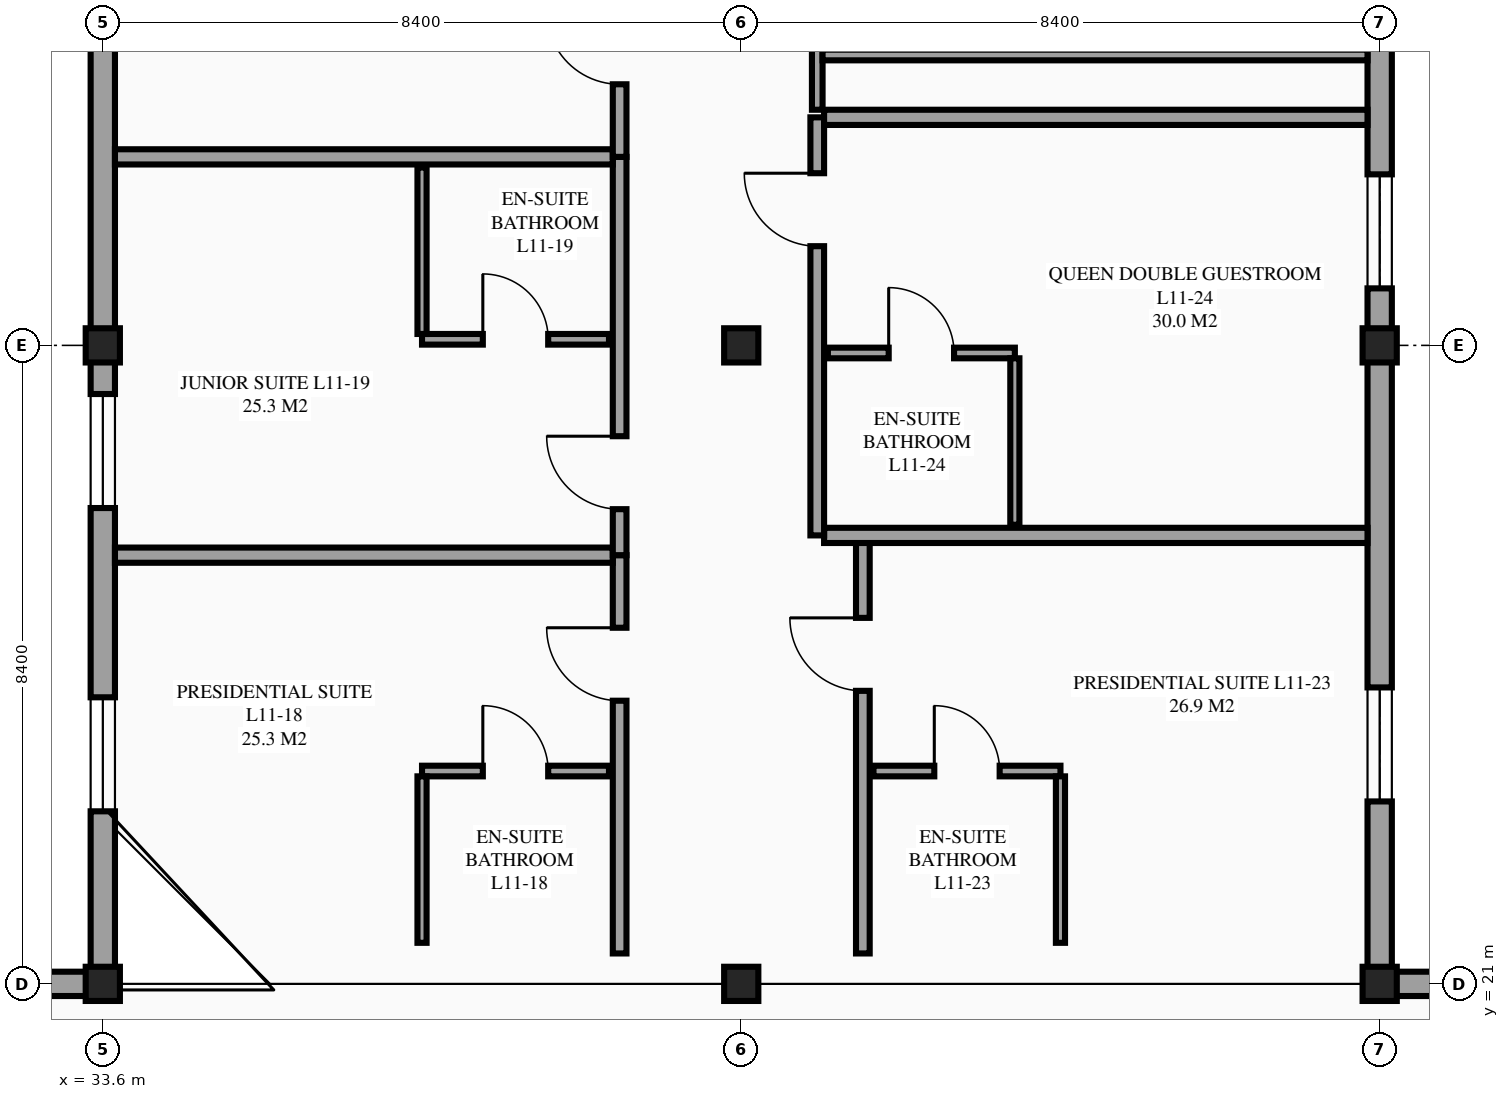
"""IFC4 building model, lengths in metres.
Left out: names, types, materials, properties, quantities, classifications, styles, units other than length and angle.
Written with IfcOpenShell. Run it as: python <this file> out.ifc"""

import sys

from ifc_helpers import new_model, si_unit, direction, frame, frame_2d, origin, origin_2d, place, context, subcontext, project, spatial, rectangle, extrude, element, fill, save


model = new_model("IFC4")
c1 = context("Model", 3, precision=1e-05, world=origin(), true_north=direction((0.0, 1.0)))
c2 = subcontext(c1, "Body", "Model", "MODEL_VIEW")
j1 = project(units=[si_unit("LENGTHUNIT", "METRE"), si_unit("PLANEANGLEUNIT", "RADIAN")], contexts=[c1])
p1 = place(None, origin())
s1 = spatial("IfcSite", under=j1, at=p1, CompositionType="ELEMENT")
p2 = place(p1, origin())
s2 = spatial("IfcBuilding", under=s1, at=p2, CompositionType="ELEMENT")
p3 = place(p2, frame((0.0, 0.0, 43.5)))
s3 = spatial("IfcBuildingStorey", under=s2, at=p3, CompositionType="ELEMENT", Elevation=43.5)
for number, where, z_axis, x_axis in (
    (1, (33.6, 21.0, 0.0), (0.0, 0.0, 1.0), (1.0, 0.0, 0.0)),
    (2, (33.6, 29.4, 0.0), (0.0, 0.0, 1.0), (1.0, 0.0, 0.0)),
    (3, (42.0, 21.0, 0.0), (0.0, 0.0, 1.0), (1.0, 0.0, 0.0)),
    (4, (42.0, 29.4, 0.0), (0.0, 0.0, 1.0), (1.0, 0.0, 0.0)),
    (5, (50.4, 21.0, 0.0), (0.0, 0.0, 1.0), (1.0, 0.0, 0.0)),
    (6, (50.4, 29.4, 0.0), (0.0, 0.0, 1.0), (1.0, 0.0, 0.0)),
):
    element("IfcColumn", number, at=place(p3, frame(where, z_axis=z_axis, x_axis=x_axis)), inside=s3, PredefinedType="COLUMN", context=c2, shape_type="SweptSolid", body=[
        extrude(rectangle(XDim=0.45, YDim=0.45, at=origin_2d()), origin(), (0.0, 0.0, 1.0), 3.6),
    ])
p4 = place(p3, frame((50.4, 21.0, 0.0), z_axis=(0.0, 0.0, 1.0), x_axis=(0.0, 1.0, 0.0)))
e7 = element("IfcWall", 7, at=p4, inside=s3, PredefinedType="STANDARD", context=c2, shape_type="SweptSolid", body=[
    extrude(rectangle(XDim=25.2, YDim=0.32, at=frame_2d((12.6, 0.0))), origin(), (0.0, 0.0, 1.0), 2.51),
])
p5 = place(p4, frame((2.4, 0.0, 0.85)))
e8 = element("IfcOpeningElement", 8, at=p5, cuts=e7, PredefinedType="OPENING", context=c2, shape_type="SweptSolid", body=[
    extrude(rectangle(XDim=1.5, YDim=1.5, at=frame_2d((0.75, 0.75))), frame((0.0, 0.17, 0.0), z_axis=(0.0, -1.0, 0.0), x_axis=(1.0, 0.0, 0.0)), (0.0, 0.0, 1.0), 0.34),
])
p6 = place(p4, frame((9.15, 0.0, 0.85)))
e9 = element("IfcOpeningElement", 9, at=p6, cuts=e7, PredefinedType="OPENING", context=c2, shape_type="SweptSolid", body=[
    extrude(rectangle(XDim=1.5, YDim=1.5, at=frame_2d((0.75, 0.75))), frame((0.0, 0.17, 0.0), z_axis=(0.0, -1.0, 0.0), x_axis=(1.0, 0.0, 0.0)), (0.0, 0.0, 1.0), 0.34),
])
p7 = place(p4, frame((17.9, 0.0, 0.85)))
e10 = element("IfcOpeningElement", 10, at=p7, cuts=e7, PredefinedType="OPENING", context=c2, shape_type="SweptSolid", body=[
    extrude(rectangle(XDim=1.5, YDim=1.5, at=frame_2d((0.75, 0.75))), frame((0.0, 0.17, 0.0), z_axis=(0.0, -1.0, 0.0), x_axis=(1.0, 0.0, 0.0)), (0.0, 0.0, 1.0), 0.34),
])
p8 = place(p4, frame((22.4, 0.0, 0.85)))
e11 = element("IfcOpeningElement", 11, at=p8, cuts=e7, PredefinedType="OPENING", context=c2, shape_type="SweptSolid", body=[
    extrude(rectangle(XDim=1.5, YDim=1.5, at=frame_2d((0.75, 0.75))), frame((0.0, 0.17, 0.0), z_axis=(0.0, -1.0, 0.0), x_axis=(1.0, 0.0, 0.0)), (0.0, 0.0, 1.0), 0.34),
])
p9 = place(p3, frame((33.6, 37.8, 0.0), z_axis=(0.0, 0.0, 1.0), x_axis=(0.0, -1.0, 0.0)))
e12 = element("IfcWall", 12, at=p9, inside=s3, PredefinedType="STANDARD", context=c2, shape_type="SweptSolid", body=[
    extrude(rectangle(XDim=16.8, YDim=0.32, at=frame_2d((8.4, 0.0))), origin(), (0.0, 0.0, 1.0), 2.76),
])
p10 = place(p9, frame((13.03, 0.0, 0.85)))
e13 = element("IfcOpeningElement", 13, at=p10, cuts=e12, PredefinedType="OPENING", context=c2, shape_type="SweptSolid", body=[
    extrude(rectangle(XDim=1.5, YDim=1.5, at=frame_2d((0.75, 0.75))), frame((0.0, 0.17, 0.0), z_axis=(0.0, -1.0, 0.0), x_axis=(1.0, 0.0, 0.0)), (0.0, 0.0, 1.0), 0.34),
])
p11 = place(p9, frame((9.04, 0.0, 0.85)))
e14 = element("IfcOpeningElement", 14, at=p11, cuts=e12, PredefinedType="OPENING", context=c2, shape_type="SweptSolid", body=[
    extrude(rectangle(XDim=1.5, YDim=1.5, at=frame_2d((0.75, 0.75))), frame((0.0, 0.17, 0.0), z_axis=(0.0, -1.0, 0.0), x_axis=(1.0, 0.0, 0.0)), (0.0, 0.0, 1.0), 0.34),
])
p12 = place(p9, frame((2.55, 0.0, 0.85)))
e15 = element("IfcOpeningElement", 15, at=p12, cuts=e12, PredefinedType="OPENING", context=c2, shape_type="SweptSolid", body=[
    extrude(rectangle(XDim=1.5, YDim=1.5, at=frame_2d((0.75, 0.75))), frame((0.0, 0.17, 0.0), z_axis=(0.0, -1.0, 0.0), x_axis=(1.0, 0.0, 0.0)), (0.0, 0.0, 1.0), 0.34),
])
p13 = place(p3, frame((33.6, 21.0, 0.0), z_axis=(0.0, 0.0, 1.0), x_axis=(-1.0, 0.0, 0.0)))
e16 = element("IfcWall", 16, at=p13, inside=s3, PredefinedType="STANDARD", context=c2, shape_type="SweptSolid", body=[
    extrude(rectangle(XDim=2.0, YDim=0.32, at=frame_2d((1.0, 0.0))), origin(), (0.0, 0.0, 1.0), 3.055),
])
p14 = place(p3, frame((40.4, 21.4, 0.0), z_axis=(0.0, 0.0, 1.0), x_axis=(0.0, 1.0, 0.0)))
e17 = element("IfcWall", 17, at=p14, inside=s3, PredefinedType="PARTITIONING", context=c2, shape_type="SweptSolid", body=[
    extrude(rectangle(XDim=5.24, YDim=0.18, at=frame_2d((2.62, 0.0))), origin(), (0.0, 0.0, 1.0), 3.355),
])
p15 = place(p14, frame((3.325, 0.0, 0.0)))
e18 = element("IfcOpeningElement", 18, at=p15, cuts=e17, PredefinedType="OPENING", context=c2, shape_type="SweptSolid", body=[
    extrude(rectangle(XDim=0.96, YDim=2.15, at=frame_2d((0.48, 1.075))), frame((0.0, 0.1, 0.0), z_axis=(0.0, -1.0, 0.0), x_axis=(1.0, 0.0, 0.0)), (0.0, 0.0, 1.0), 0.2),
])
p16 = place(p3, frame((33.76, 26.64, 0.0), z_axis=(0.0, 0.0, 1.0), x_axis=(1.0, 0.0, 0.0)))
e19 = element("IfcWall", 19, at=p16, inside=s3, PredefinedType="PARTITIONING", context=c2, shape_type="SweptSolid", body=[
    extrude(rectangle(XDim=6.55, YDim=0.2, at=frame_2d((3.275, 0.0))), origin(), (0.0, 0.0, 1.0), 3.355),
])
p17 = place(p3, frame((37.8, 23.8, 0.0), z_axis=(0.0, 0.0, 1.0), x_axis=(1.0, 0.0, 0.0)))
e20 = element("IfcWall", 20, at=p17, inside=s3, PredefinedType="PARTITIONING", context=c2, shape_type="SweptSolid", body=[
    extrude(rectangle(XDim=2.46, YDim=0.14, at=frame_2d((1.23, 0.0))), origin(), (0.0, 0.0, 1.0), 3.355),
])
p18 = place(p17, frame((0.8, 0.0, 0.0)))
e21 = element("IfcOpeningElement", 21, at=p18, cuts=e20, PredefinedType="OPENING", context=c2, shape_type="SweptSolid", body=[
    extrude(rectangle(XDim=0.86, YDim=2.1, at=frame_2d((0.43, 1.05))), frame((0.0, 0.08, 0.0), z_axis=(0.0, -1.0, 0.0), x_axis=(1.0, 0.0, 0.0)), (0.0, 0.0, 1.0), 0.16),
])
p19 = place(p3, frame((37.8, 21.54, 0.0), z_axis=(0.0, 0.0, 1.0), x_axis=(0.0, 1.0, 0.0)))
e22 = element("IfcWall", 22, at=p19, inside=s3, PredefinedType="PARTITIONING", context=c2, shape_type="SweptSolid", body=[
    extrude(rectangle(XDim=2.19, YDim=0.12, at=frame_2d((1.095, 0.0))), origin(), (0.0, 0.0, 1.0), 3.355),
])
p20 = place(p3, frame((40.4, 26.64, 0.0), z_axis=(0.0, 0.0, 1.0), x_axis=(0.0, 1.0, 0.0)))
e23 = element("IfcWall", 23, at=p20, inside=s3, PredefinedType="PARTITIONING", context=c2, shape_type="SweptSolid", body=[
    extrude(rectangle(XDim=5.24, YDim=0.18, at=frame_2d((2.62, 0.0))), origin(), (0.0, 0.0, 1.0), 3.355),
])
p21 = place(p20, frame((0.605, 0.0, 0.0)))
e24 = element("IfcOpeningElement", 24, at=p21, cuts=e23, PredefinedType="OPENING", context=c2, shape_type="SweptSolid", body=[
    extrude(rectangle(XDim=0.96, YDim=2.15, at=frame_2d((0.48, 1.075))), frame((0.0, 0.1, 0.0), z_axis=(0.0, -1.0, 0.0), x_axis=(1.0, 0.0, 0.0)), (0.0, 0.0, 1.0), 0.2),
])
p22 = place(p3, frame((33.76, 31.88, 0.0), z_axis=(0.0, 0.0, 1.0), x_axis=(1.0, 0.0, 0.0)))
e25 = element("IfcWall", 25, at=p22, inside=s3, PredefinedType="PARTITIONING", context=c2, shape_type="SweptSolid", body=[
    extrude(rectangle(XDim=6.55, YDim=0.2, at=frame_2d((3.275, 0.0))), origin(), (0.0, 0.0, 1.0), 3.355),
])
p23 = place(p3, frame((37.8, 29.48, 0.0), z_axis=(0.0, 0.0, 1.0), x_axis=(1.0, 0.0, 0.0)))
e26 = element("IfcWall", 26, at=p23, inside=s3, PredefinedType="PARTITIONING", context=c2, shape_type="SweptSolid", body=[
    extrude(rectangle(XDim=2.46, YDim=0.14, at=frame_2d((1.23, 0.0))), origin(), (0.0, 0.0, 1.0), 2.56),
])
p24 = place(p23, frame((0.8, 0.0, 0.0)))
e27 = element("IfcOpeningElement", 27, at=p24, cuts=e26, PredefinedType="OPENING", context=c2, shape_type="SweptSolid", body=[
    extrude(rectangle(XDim=0.86, YDim=2.1, at=frame_2d((0.43, 1.05))), frame((0.0, 0.08, 0.0), z_axis=(0.0, -1.0, 0.0), x_axis=(1.0, 0.0, 0.0)), (0.0, 0.0, 1.0), 0.16),
])
p25 = place(p3, frame((37.8, 29.55, 0.0), z_axis=(0.0, 0.0, 1.0), x_axis=(0.0, 1.0, 0.0)))
e28 = element("IfcWall", 28, at=p25, inside=s3, PredefinedType="PARTITIONING", context=c2, shape_type="SweptSolid", body=[
    extrude(rectangle(XDim=2.19, YDim=0.12, at=frame_2d((1.095, 0.0))), origin(), (0.0, 0.0, 1.0), 3.355),
])
p26 = place(p3, frame((40.4, 31.88, 0.0), z_axis=(0.0, 0.0, 1.0), x_axis=(0.0, 1.0, 0.0)))
e29 = element("IfcWall", 29, at=p26, inside=s3, PredefinedType="PARTITIONING", context=c2, shape_type="SweptSolid", body=[
    extrude(rectangle(XDim=5.24, YDim=0.18, at=frame_2d((2.62, 0.0))), origin(), (0.0, 0.0, 1.0), 3.355),
])
p27 = place(p26, frame((0.955, 0.0, 0.0)))
e30 = element("IfcOpeningElement", 30, at=p27, cuts=e29, PredefinedType="OPENING", context=c2, shape_type="SweptSolid", body=[
    extrude(rectangle(XDim=0.96, YDim=2.15, at=frame_2d((0.48, 1.075))), frame((0.0, 0.1, 0.0), z_axis=(0.0, -1.0, 0.0), x_axis=(1.0, 0.0, 0.0)), (0.0, 0.0, 1.0), 0.2),
])
p28 = place(p3, frame((43.6, 21.4, 0.0), z_axis=(0.0, 0.0, 1.0), x_axis=(0.0, 1.0, 0.0)))
e31 = element("IfcWall", 31, at=p28, inside=s3, PredefinedType="PARTITIONING", context=c2, shape_type="SweptSolid", body=[
    extrude(rectangle(XDim=5.5, YDim=0.18, at=frame_2d((2.75, 0.0))), origin(), (0.0, 0.0, 1.0), 3.355),
])
p29 = place(p28, frame((3.455, 0.0, 0.0)))
e32 = element("IfcOpeningElement", 32, at=p29, cuts=e31, PredefinedType="OPENING", context=c2, shape_type="SweptSolid", body=[
    extrude(rectangle(XDim=0.96, YDim=2.15, at=frame_2d((0.48, 1.075))), frame((0.0, 0.1, 0.0), z_axis=(0.0, -1.0, 0.0), x_axis=(1.0, 0.0, 0.0)), (0.0, 0.0, 1.0), 0.2),
])
p30 = place(p3, frame((43.09, 26.9, 0.0), z_axis=(0.0, 0.0, 1.0), x_axis=(1.0, 0.0, 0.0)))
e33 = element("IfcWall", 33, at=p30, inside=s3, PredefinedType="PARTITIONING", context=c2, shape_type="SweptSolid", body=[
    extrude(rectangle(XDim=7.15, YDim=0.2, at=frame_2d((3.575, 0.0))), origin(), (0.0, 0.0, 1.0), 3.355),
])
p31 = place(p3, frame((43.74, 23.8, 0.0), z_axis=(0.0, 0.0, 1.0), x_axis=(1.0, 0.0, 0.0)))
e34 = element("IfcWall", 34, at=p31, inside=s3, PredefinedType="PARTITIONING", context=c2, shape_type="SweptSolid", body=[
    extrude(rectangle(XDim=2.46, YDim=0.14, at=frame_2d((1.23, 0.0))), origin(), (0.0, 0.0, 1.0), 3.355),
])
p32 = place(p31, frame((0.8, 0.0, 0.0)))
e35 = element("IfcOpeningElement", 35, at=p32, cuts=e34, PredefinedType="OPENING", context=c2, shape_type="SweptSolid", body=[
    extrude(rectangle(XDim=0.86, YDim=2.1, at=frame_2d((0.43, 1.05))), frame((0.0, 0.08, 0.0), z_axis=(0.0, -1.0, 0.0), x_axis=(1.0, 0.0, 0.0)), (0.0, 0.0, 1.0), 0.16),
])
p33 = place(p3, frame((46.2, 21.54, 0.0), z_axis=(0.0, 0.0, 1.0), x_axis=(0.0, 1.0, 0.0)))
e36 = element("IfcWall", 36, at=p33, inside=s3, PredefinedType="PARTITIONING", context=c2, shape_type="SweptSolid", body=[
    extrude(rectangle(XDim=2.19, YDim=0.12, at=frame_2d((1.095, 0.0))), origin(), (0.0, 0.0, 1.0), 3.355),
])
p34 = place(p3, frame((43.0, 26.9, 0.0), z_axis=(0.0, 0.0, 1.0), x_axis=(0.0, 1.0, 0.0)))
e37 = element("IfcWall", 37, at=p34, inside=s3, PredefinedType="PARTITIONING", context=c2, shape_type="SweptSolid", body=[
    extrude(rectangle(XDim=5.5, YDim=0.18, at=frame_2d((2.75, 0.0))), origin(), (0.0, 0.0, 1.0), 3.355),
])
p35 = place(p34, frame((3.805, 0.0, 0.0)))
e38 = element("IfcOpeningElement", 38, at=p35, cuts=e37, PredefinedType="OPENING", context=c2, shape_type="SweptSolid", body=[
    extrude(rectangle(XDim=0.96, YDim=2.15, at=frame_2d((0.48, 1.075))), frame((0.0, 0.1, 0.0), z_axis=(0.0, -1.0, 0.0), x_axis=(1.0, 0.0, 0.0)), (0.0, 0.0, 1.0), 0.2),
])
p36 = place(p3, frame((43.09, 32.4, 0.0), z_axis=(0.0, 0.0, 1.0), x_axis=(1.0, 0.0, 0.0)))
e39 = element("IfcWall", 39, at=p36, inside=s3, PredefinedType="PARTITIONING", context=c2, shape_type="SweptSolid", body=[
    extrude(rectangle(XDim=7.15, YDim=0.2, at=frame_2d((3.575, 0.0))), origin(), (0.0, 0.0, 1.0), 3.355),
])
p37 = place(p3, frame((43.14, 29.3, 0.0), z_axis=(0.0, 0.0, 1.0), x_axis=(1.0, 0.0, 0.0)))
e40 = element("IfcWall", 40, at=p37, inside=s3, PredefinedType="PARTITIONING", context=c2, shape_type="SweptSolid", body=[
    extrude(rectangle(XDim=2.46, YDim=0.14, at=frame_2d((1.23, 0.0))), origin(), (0.0, 0.0, 1.0), 2.51),
])
p38 = place(p37, frame((0.8, 0.0, 0.0)))
e41 = element("IfcOpeningElement", 41, at=p38, cuts=e40, PredefinedType="OPENING", context=c2, shape_type="SweptSolid", body=[
    extrude(rectangle(XDim=0.86, YDim=2.1, at=frame_2d((0.43, 1.05))), frame((0.0, 0.08, 0.0), z_axis=(0.0, -1.0, 0.0), x_axis=(1.0, 0.0, 0.0)), (0.0, 0.0, 1.0), 0.16),
])
p39 = place(p3, frame((45.6, 27.04, 0.0), z_axis=(0.0, 0.0, 1.0), x_axis=(0.0, 1.0, 0.0)))
e42 = element("IfcWall", 42, at=p39, inside=s3, PredefinedType="PARTITIONING", context=c2, shape_type="SweptSolid", body=[
    extrude(rectangle(XDim=2.19, YDim=0.12, at=frame_2d((1.095, 0.0))), origin(), (0.0, 0.0, 1.0), 3.355),
])
p40 = place(p3, frame((43.0, 32.5, 0.0), z_axis=(0.0, 0.0, 1.0), x_axis=(0.0, 1.0, 0.0)))
e43 = element("IfcWall", 43, at=p40, inside=s3, PredefinedType="PARTITIONING", context=c2, shape_type="SweptSolid", body=[
    extrude(rectangle(XDim=4.8, YDim=0.14, at=frame_2d((2.4, 0.0))), origin(), (0.0, 0.0, 1.0), 3.355),
])
p41 = place(p40, frame((2.05, 0.0, 0.0)))
e44 = element("IfcOpeningElement", 44, at=p41, cuts=e43, PredefinedType="OPENING", context=c2, shape_type="SweptSolid", body=[
    extrude(rectangle(XDim=0.9, YDim=2.12, at=frame_2d((0.45, 1.06))), frame((0.0, 0.08, 0.0), z_axis=(0.0, -1.0, 0.0), x_axis=(1.0, 0.0, 0.0)), (0.0, 0.0, 1.0), 0.16),
])
p42 = place(p3, frame((43.07, 33.22, 0.0), z_axis=(0.0, 0.0, 1.0), x_axis=(1.0, 0.0, 0.0)))
e45 = element("IfcWall", 45, at=p42, inside=s3, PredefinedType="PARTITIONING", context=c2, shape_type="SweptSolid", body=[
    extrude(rectangle(XDim=7.17, YDim=0.14, at=frame_2d((3.585, 0.0))), origin(), (0.0, 0.0, 1.0), 3.355),
])
p43 = place(p3, frame((58.8, 21.0, 0.0), z_axis=(0.0, 0.0, 1.0), x_axis=(-1.0, 0.0, 0.0)))
e46 = element("IfcWall", 46, at=p43, inside=s3, PredefinedType="STANDARD", context=c2, shape_type="SweptSolid", body=[
    extrude(rectangle(XDim=8.4, YDim=0.32, at=frame_2d((4.2, 0.0))), origin(), (0.0, 0.0, 1.0), 3.05),
])
p44 = place(p43, frame((3.15, 0.0, 0.75)))
e47 = element("IfcOpeningElement", 47, at=p44, cuts=e46, PredefinedType="OPENING", context=c2, shape_type="SweptSolid", body=[
    extrude(rectangle(XDim=2.1, YDim=1.5, at=frame_2d((1.05, 0.75))), frame((0.0, 0.17, 0.0), z_axis=(0.0, -1.0, 0.0), x_axis=(1.0, 0.0, 0.0)), (0.0, 0.0, 1.0), 0.34),
])
p45 = place(p10, origin())
e48 = element("IfcWindow", 48, at=p45, inside=s3, PartitioningType="SINGLE_PANEL", PredefinedType="WINDOW", context=c2, shape_type="SweptSolid", body=[
    extrude(rectangle(XDim=1.5, YDim=1.5, at=frame_2d((0.75, 0.75))), frame((0.0, 0.03, 0.0), z_axis=(0.0, -1.0, 0.0), x_axis=(1.0, 0.0, 0.0)), (0.0, 0.0, 1.0), 0.06),
])
fill(e13, e48)
p46 = place(p11, origin())
e49 = element("IfcWindow", 49, at=p46, inside=s3, PartitioningType="SINGLE_PANEL", PredefinedType="WINDOW", context=c2, shape_type="SweptSolid", body=[
    extrude(rectangle(XDim=1.5, YDim=1.5, at=frame_2d((0.75, 0.75))), frame((0.0, 0.03, 0.0), z_axis=(0.0, -1.0, 0.0), x_axis=(1.0, 0.0, 0.0)), (0.0, 0.0, 1.0), 0.06),
])
fill(e14, e49)
p47 = place(p5, origin())
e50 = element("IfcWindow", 50, at=p47, inside=s3, PartitioningType="SINGLE_PANEL", PredefinedType="WINDOW", context=c2, shape_type="SweptSolid", body=[
    extrude(rectangle(XDim=1.5, YDim=1.5, at=frame_2d((0.75, 0.75))), frame((0.0, 0.03, 0.0), z_axis=(0.0, -1.0, 0.0), x_axis=(1.0, 0.0, 0.0)), (0.0, 0.0, 1.0), 0.06),
])
fill(e8, e50)
p48 = place(p6, origin())
e51 = element("IfcWindow", 51, at=p48, inside=s3, PartitioningType="SINGLE_PANEL", PredefinedType="WINDOW", context=c2, shape_type="SweptSolid", body=[
    extrude(rectangle(XDim=1.5, YDim=1.5, at=frame_2d((0.75, 0.75))), frame((0.0, 0.03, 0.0), z_axis=(0.0, -1.0, 0.0), x_axis=(1.0, 0.0, 0.0)), (0.0, 0.0, 1.0), 0.06),
])
fill(e9, e51)
p49 = place(p15, origin())
e52 = element("IfcDoor", 52, at=p49, inside=s3, OperationType="SINGLE_SWING_RIGHT", PredefinedType="DOOR", context=c2, shape_type="SweptSolid", body=[
    extrude(rectangle(XDim=0.96, YDim=2.15, at=frame_2d((0.48, 1.075))), frame((0.0, 0.025, 0.0), z_axis=(0.0, -1.0, 0.0), x_axis=(1.0, 0.0, 0.0)), (0.0, 0.0, 1.0), 0.05),
])
fill(e18, e52)
p50 = place(p18, origin())
e53 = element("IfcDoor", 53, at=p50, inside=s3, OperationType="SINGLE_SWING_LEFT", PredefinedType="DOOR", context=c2, shape_type="SweptSolid", body=[
    extrude(rectangle(XDim=0.86, YDim=2.1, at=frame_2d((0.43, 1.05))), frame((0.0, 0.025, 0.0), z_axis=(0.0, -1.0, 0.0), x_axis=(1.0, 0.0, 0.0)), (0.0, 0.0, 1.0), 0.05),
])
fill(e21, e53)
p51 = place(p21, origin())
e54 = element("IfcDoor", 54, at=p51, inside=s3, OperationType="SINGLE_SWING_RIGHT", PredefinedType="DOOR", context=c2, shape_type="SweptSolid", body=[
    extrude(rectangle(XDim=0.96, YDim=2.15, at=frame_2d((0.48, 1.075))), frame((0.0, 0.025, 0.0), z_axis=(0.0, -1.0, 0.0), x_axis=(1.0, 0.0, 0.0)), (0.0, 0.0, 1.0), 0.05),
])
fill(e24, e54)
p52 = place(p24, origin())
e55 = element("IfcDoor", 55, at=p52, inside=s3, OperationType="SINGLE_SWING_LEFT", PredefinedType="DOOR", context=c2, shape_type="SweptSolid", body=[
    extrude(rectangle(XDim=0.86, YDim=2.1, at=frame_2d((0.43, 1.05))), frame((0.0, 0.025, 0.0), z_axis=(0.0, -1.0, 0.0), x_axis=(1.0, 0.0, 0.0)), (0.0, 0.0, 1.0), 0.05),
])
fill(e27, e55)
p53 = place(p27, origin())
e56 = element("IfcDoor", 56, at=p53, inside=s3, OperationType="SINGLE_SWING_RIGHT", PredefinedType="DOOR", context=c2, shape_type="SweptSolid", body=[
    extrude(rectangle(XDim=0.96, YDim=2.15, at=frame_2d((0.48, 1.075))), frame((0.0, 0.025, 0.0), z_axis=(0.0, -1.0, 0.0), x_axis=(1.0, 0.0, 0.0)), (0.0, 0.0, 1.0), 0.05),
])
fill(e30, e56)
p54 = place(p29, origin())
e57 = element("IfcDoor", 57, at=p54, inside=s3, OperationType="SINGLE_SWING_RIGHT", PredefinedType="DOOR", context=c2, shape_type="SweptSolid", body=[
    extrude(rectangle(XDim=0.96, YDim=2.15, at=frame_2d((0.48, 1.075))), frame((0.0, 0.025, 0.0), z_axis=(0.0, -1.0, 0.0), x_axis=(1.0, 0.0, 0.0)), (0.0, 0.0, 1.0), 0.05),
])
fill(e32, e57)
p55 = place(p32, origin())
e58 = element("IfcDoor", 58, at=p55, inside=s3, OperationType="SINGLE_SWING_LEFT", PredefinedType="DOOR", context=c2, shape_type="SweptSolid", body=[
    extrude(rectangle(XDim=0.86, YDim=2.1, at=frame_2d((0.43, 1.05))), frame((0.0, 0.025, 0.0), z_axis=(0.0, -1.0, 0.0), x_axis=(1.0, 0.0, 0.0)), (0.0, 0.0, 1.0), 0.05),
])
fill(e35, e58)
p56 = place(p35, origin())
e59 = element("IfcDoor", 59, at=p56, inside=s3, OperationType="SINGLE_SWING_RIGHT", PredefinedType="DOOR", context=c2, shape_type="SweptSolid", body=[
    extrude(rectangle(XDim=0.96, YDim=2.15, at=frame_2d((0.48, 1.075))), frame((0.0, 0.025, 0.0), z_axis=(0.0, -1.0, 0.0), x_axis=(1.0, 0.0, 0.0)), (0.0, 0.0, 1.0), 0.05),
])
fill(e38, e59)
p57 = place(p38, origin())
e60 = element("IfcDoor", 60, at=p57, inside=s3, OperationType="SINGLE_SWING_LEFT", PredefinedType="DOOR", context=c2, shape_type="SweptSolid", body=[
    extrude(rectangle(XDim=0.86, YDim=2.1, at=frame_2d((0.43, 1.05))), frame((0.0, 0.025, 0.0), z_axis=(0.0, -1.0, 0.0), x_axis=(1.0, 0.0, 0.0)), (0.0, 0.0, 1.0), 0.05),
])
fill(e41, e60)
save(model, sys.argv[1])
